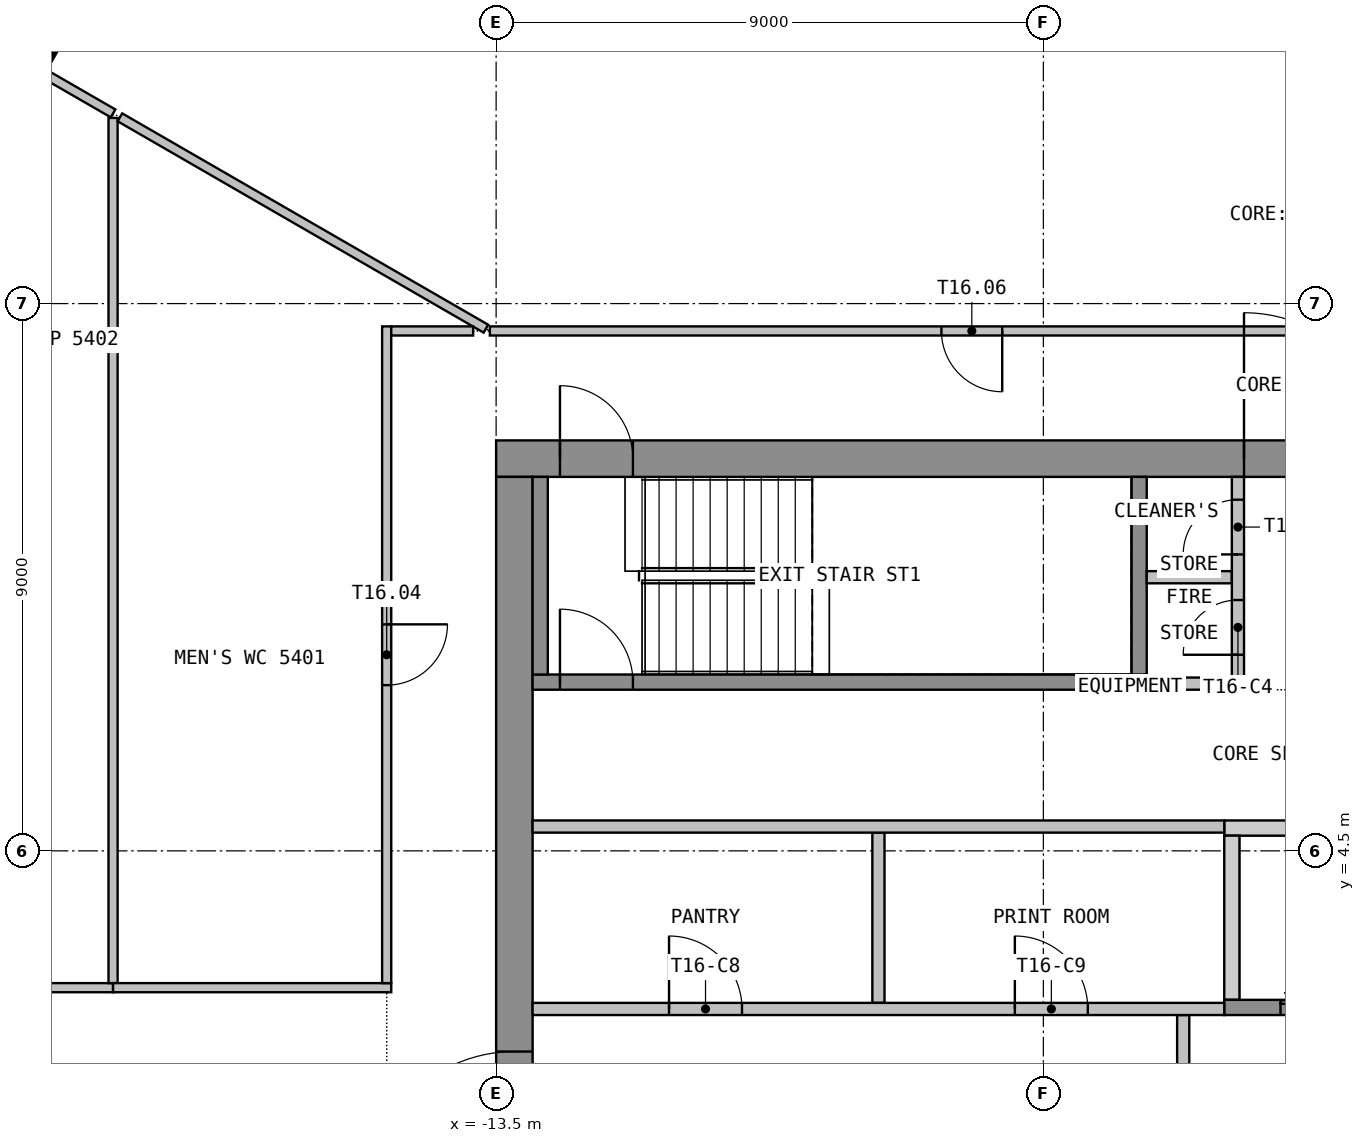
"""IFC4 building model, lengths in metres.
Left out: names, types, materials, properties, quantities, classifications, styles, units other than length and angle.
Written with IfcOpenShell. Run it as: python <this file> out.ifc"""

import sys

from ifc_helpers import new_model, si_unit, direction, frame, frame_2d, origin, origin_2d, place, context, subcontext, project, spatial, polyline, rectangle, outline, extrude, element, fill, save


model = new_model("IFC4")
c1 = context("Model", 3, precision=1e-05, world=origin(), true_north=direction((0.0, 1.0)))
c2 = subcontext(c1, "Body", "Model", "MODEL_VIEW")
j1 = project(units=[si_unit("LENGTHUNIT", "METRE"), si_unit("PLANEANGLEUNIT", "RADIAN")], contexts=[c1])
p1 = place(None, origin())
s1 = spatial("IfcSite", under=j1, at=p1, CompositionType="ELEMENT")
p2 = place(p1, origin())
s2 = spatial("IfcBuilding", under=s1, at=p2, CompositionType="ELEMENT")
p3 = place(p2, frame((0.0, 0.0, 219.0)))
s3 = spatial("IfcBuildingStorey", under=s2, at=p3, CompositionType="ELEMENT", Elevation=219.0)
p4 = place(p3, frame((-21.421, 17.563, 0.0), z_axis=(0.0, 0.0, 1.0), x_axis=(-0.5, -0.866025403784, 0.0)))
e1 = element("IfcColumn", 1, at=p4, inside=s3, PredefinedType="COLUMN", context=c2, shape_type="SweptSolid", body=[
    extrude(rectangle(XDim=0.8, YDim=1.1, at=origin_2d()), origin(), (0.0, 0.0, 1.0), 3.55),
])
p5 = place(p3, frame((-13.5, 10.95, 0.0), z_axis=(0.0, 0.0, 1.0), x_axis=(1.0, 0.0, 0.0)))
e2 = element("IfcWall", 2, at=p5, inside=s3, PredefinedType="SHEAR", context=c2, shape_type="SweptSolid", body=[
    extrude(rectangle(XDim=27.0, YDim=0.6, at=frame_2d((13.5, 0.0))), origin(), (0.0, 0.0, 1.0), 3.55),
])
p6 = place(p5, frame((12.3, 0.0, 0.0)))
e3 = element("IfcOpeningElement", 3, at=p6, cuts=e2, PredefinedType="OPENING", context=c2, shape_type="SweptSolid", body=[
    extrude(rectangle(XDim=2.4, YDim=2.1, at=frame_2d((1.2, 1.05))), frame((0.0, 0.31, 0.0), z_axis=(0.0, -1.0, 0.0), x_axis=(1.0, 0.0, 0.0)), (0.0, 0.0, 1.0), 0.62),
])
p7 = place(p5, frame((1.05, 0.0, 0.0)))
e4 = element("IfcOpeningElement", 4, at=p7, cuts=e2, PredefinedType="OPENING", context=c2, shape_type="SweptSolid", body=[
    extrude(rectangle(XDim=1.2, YDim=2.1, at=frame_2d((0.6, 1.05))), frame((0.0, 0.31, 0.0), z_axis=(0.0, -1.0, 0.0), x_axis=(1.0, 0.0, 0.0)), (0.0, 0.0, 1.0), 0.62),
])
p8 = place(p5, frame((24.75, 0.0, 0.0)))
e5 = element("IfcOpeningElement", 5, at=p8, cuts=e2, PredefinedType="OPENING", context=c2, shape_type="SweptSolid", body=[
    extrude(rectangle(XDim=1.2, YDim=2.1, at=frame_2d((0.6, 1.05))), frame((0.0, 0.31, 0.0), z_axis=(0.0, -1.0, 0.0), x_axis=(1.0, 0.0, 0.0)), (0.0, 0.0, 1.0), 0.62),
])
p9 = place(p3, frame((-13.2, -10.65, 0.0), z_axis=(0.0, 0.0, 1.0), x_axis=(0.0, 1.0, 0.0)))
e6 = element("IfcWall", 6, at=p9, inside=s3, PredefinedType="SHEAR", context=c2, shape_type="SweptSolid", body=[
    extrude(rectangle(XDim=21.3, YDim=0.6, at=frame_2d((10.65, 0.0))), origin(), (0.0, 0.0, 1.0), 3.55),
])
p10 = place(p9, frame((9.45, 0.0, 0.0)))
e7 = element("IfcOpeningElement", 7, at=p10, cuts=e6, PredefinedType="OPENING", context=c2, shape_type="SweptSolid", body=[
    extrude(rectangle(XDim=2.4, YDim=2.1, at=frame_2d((1.2, 1.05))), frame((0.0, 0.31, 0.0), z_axis=(0.0, -1.0, 0.0), x_axis=(1.0, 0.0, 0.0)), (0.0, 0.0, 1.0), 0.62),
])
p11 = place(p3, origin())
e8 = element("IfcWall", 8, at=p11, inside=s3, PredefinedType="SHEAR", context=c2, shape_type="SweptSolid", body=[
    extrude(outline(polyline([(-1.525, 4.75), (1.525, 4.75), (1.525, 5.0), (-1.525, 5.0), (-1.525, 4.75)])), origin(), (0.0, 0.0, 1.0), 3.55),
])
p12 = place(p3, origin())
e9 = element("IfcWall", 9, at=p12, inside=s3, PredefinedType="SHEAR", context=c2, shape_type="SweptSolid", body=[
    extrude(outline(polyline([(-1.525, 2.05), (-1.275, 2.05), (-1.275, 4.75), (-1.525, 4.75), (-1.525, 2.05)])), origin(), (0.0, 0.0, 1.0), 3.55),
])
p13 = place(p3, frame((-1.525, 1.925, 0.0), z_axis=(0.0, 0.0, 1.0), x_axis=(1.0, 0.0, 0.0)))
e10 = element("IfcWall", 10, at=p13, inside=s3, PredefinedType="SHEAR", context=c2, shape_type="SweptSolid", body=[
    extrude(rectangle(XDim=3.05, YDim=0.25, at=frame_2d((1.525, 0.0))), origin(), (0.0, 0.0, 1.0), 3.55),
])
p14 = place(p13, frame((0.925, 0.0, 0.0)))
e11 = element("IfcOpeningElement", 11, at=p14, cuts=e10, PredefinedType="OPENING", context=c2, shape_type="SweptSolid", body=[
    extrude(rectangle(XDim=1.2, YDim=2.1, at=frame_2d((0.6, 1.05))), frame((0.0, 0.135, 0.0), z_axis=(0.0, -1.0, 0.0), x_axis=(1.0, 0.0, 0.0)), (0.0, 0.0, 1.0), 0.27),
])
p15 = place(p3, frame((-2.2, -1.8, 0.0), z_axis=(0.0, 0.0, 1.0), x_axis=(0.0, 1.0, 0.0)))
e12 = element("IfcWall", 12, at=p15, inside=s3, PredefinedType="PARTITIONING", context=c2, shape_type="SweptSolid", body=[
    extrude(rectangle(XDim=3.6, YDim=0.2, at=frame_2d((1.8, 0.0))), origin(), (0.0, 0.0, 1.0), 3.55),
])
p16 = place(p15, frame((1.2, 0.0, 0.0)))
e13 = element("IfcOpeningElement", 13, at=p16, cuts=e12, PredefinedType="OPENING", context=c2, shape_type="SweptSolid", body=[
    extrude(rectangle(XDim=1.2, YDim=2.1, at=frame_2d((0.6, 1.05))), frame((0.0, 0.11, 0.0), z_axis=(0.0, -1.0, 0.0), x_axis=(1.0, 0.0, 0.0)), (0.0, 0.0, 1.0), 0.22),
])
p17 = place(p3, frame((-12.9, 7.275, 0.0), z_axis=(0.0, 0.0, 1.0), x_axis=(1.0, 0.0, 0.0)))
e14 = element("IfcWall", 14, at=p17, inside=s3, PredefinedType="SHEAR", context=c2, shape_type="SweptSolid", body=[
    extrude(rectangle(XDim=10.1, YDim=0.25, at=frame_2d((5.05, 0.0))), origin(), (0.0, 0.0, 1.0), 3.55),
])
p18 = place(p17, frame((0.45, 0.0, 0.0)))
e15 = element("IfcOpeningElement", 15, at=p18, cuts=e14, PredefinedType="OPENING", context=c2, shape_type="SweptSolid", body=[
    extrude(rectangle(XDim=1.2, YDim=2.1, at=frame_2d((0.6, 1.05))), frame((0.0, 0.135, 0.0), z_axis=(0.0, -1.0, 0.0), x_axis=(1.0, 0.0, 0.0)), (0.0, 0.0, 1.0), 0.27),
])
for number, where, z_axis, x_axis in (
    (16, (-12.775, 7.4, 0.0), (0.0, 0.0, 1.0), (0.0, 1.0, 0.0)),
    (17, (-2.925, 7.4, 0.0), (0.0, 0.0, 1.0), (0.0, 1.0, 0.0)),
):
    element("IfcWall", number, at=place(p3, frame(where, z_axis=z_axis, x_axis=x_axis)), inside=s3, PredefinedType="SHEAR", context=c2, shape_type="SweptSolid", body=[
        extrude(rectangle(XDim=3.25, YDim=0.25, at=frame_2d((1.625, 0.0))), origin(), (0.0, 0.0, 1.0), 3.55),
    ])
for number, where, z_axis, x_axis in (
    (18, (-2.8, 7.25, 0.0), (0.0, 0.0, 1.0), (1.0, 0.0, 0.0)),
    (19, (-2.8, 9.0, 0.0), (0.0, 0.0, 1.0), (1.0, 0.0, 0.0)),
):
    element("IfcWall", number, at=place(p3, frame(where, z_axis=z_axis, x_axis=x_axis)), inside=s3, PredefinedType="PARTITIONING", context=c2, shape_type="SweptSolid", body=[
        extrude(rectangle(XDim=1.4, YDim=0.2, at=frame_2d((0.7, 0.0))), origin(), (0.0, 0.0, 1.0), 3.55),
    ])
p19 = place(p3, frame((-1.3, 7.15, 0.0), z_axis=(0.0, 0.0, 1.0), x_axis=(0.0, 1.0, 0.0)))
e20 = element("IfcWall", 20, at=p19, inside=s3, PredefinedType="PARTITIONING", context=c2, shape_type="SweptSolid", body=[
    extrude(rectangle(XDim=3.5, YDim=0.2, at=frame_2d((1.75, 0.0))), origin(), (0.0, 0.0, 1.0), 3.55),
])
p20 = place(p19, frame((0.575, 0.0, 0.0)))
e21 = element("IfcOpeningElement", 21, at=p20, cuts=e20, PredefinedType="OPENING", context=c2, shape_type="SweptSolid", body=[
    extrude(rectangle(XDim=0.9, YDim=2.1, at=frame_2d((0.45, 1.05))), frame((0.0, 0.11, 0.0), z_axis=(0.0, -1.0, 0.0), x_axis=(1.0, 0.0, 0.0)), (0.0, 0.0, 1.0), 0.22),
])
p21 = place(p19, frame((2.225, 0.0, 0.0)))
e22 = element("IfcOpeningElement", 22, at=p21, cuts=e20, PredefinedType="OPENING", context=c2, shape_type="SweptSolid", body=[
    extrude(rectangle(XDim=0.9, YDim=2.1, at=frame_2d((0.45, 1.05))), frame((0.0, 0.11, 0.0), z_axis=(0.0, -1.0, 0.0), x_axis=(1.0, 0.0, 0.0)), (0.0, 0.0, 1.0), 0.22),
])
p22 = place(p3, frame((-7.212, 2.0, 0.0), z_axis=(0.0, 0.0, 1.0), x_axis=(0.0, 1.0, 0.0)))
e23 = element("IfcWall", 23, at=p22, inside=s3, PredefinedType="PARTITIONING", context=c2, shape_type="SweptSolid", body=[
    extrude(rectangle(XDim=2.8, YDim=0.2, at=frame_2d((1.4, 0.0))), origin(), (0.0, 0.0, 1.0), 3.55),
])
p23 = place(p3, frame((-12.9, 1.9, 0.0), z_axis=(0.0, 0.0, 1.0), x_axis=(1.0, 0.0, 0.0)))
e24 = element("IfcWall", 24, at=p23, inside=s3, PredefinedType="PARTITIONING", context=c2, shape_type="SweptSolid", body=[
    extrude(rectangle(XDim=11.375, YDim=0.2, at=frame_2d((5.688, 0.0))), origin(), (0.0, 0.0, 1.0), 3.55),
])
p24 = place(p23, frame((2.244, 0.0, 0.0)))
e25 = element("IfcOpeningElement", 25, at=p24, cuts=e24, PredefinedType="OPENING", context=c2, shape_type="SweptSolid", body=[
    extrude(rectangle(XDim=1.2, YDim=2.1, at=frame_2d((0.6, 1.05))), frame((0.0, 0.11, 0.0), z_axis=(0.0, -1.0, 0.0), x_axis=(1.0, 0.0, 0.0)), (0.0, 0.0, 1.0), 0.22),
])
p25 = place(p23, frame((7.931, 0.0, 0.0)))
e26 = element("IfcOpeningElement", 26, at=p25, cuts=e24, PredefinedType="OPENING", context=c2, shape_type="SweptSolid", body=[
    extrude(rectangle(XDim=1.2, YDim=2.1, at=frame_2d((0.6, 1.05))), frame((0.0, 0.11, 0.0), z_axis=(0.0, -1.0, 0.0), x_axis=(1.0, 0.0, 0.0)), (0.0, 0.0, 1.0), 0.22),
])
p26 = place(p3, frame((-12.9, 4.9, 0.0), z_axis=(0.0, 0.0, 1.0), x_axis=(1.0, 0.0, 0.0)))
e27 = element("IfcWall", 27, at=p26, inside=s3, PredefinedType="PARTITIONING", context=c2, shape_type="SweptSolid", body=[
    extrude(rectangle(XDim=11.375, YDim=0.2, at=frame_2d((5.688, 0.0))), origin(), (0.0, 0.0, 1.0), 3.55),
])
p27 = place(p3, frame((-29.585, 2.25, 0.0), z_axis=(0.0, 0.0, 1.0), x_axis=(1.0, 0.0, 0.0)))
e28 = element("IfcWall", 28, at=p27, inside=s3, PredefinedType="PARTITIONING", context=c2, shape_type="SweptSolid", body=[
    extrude(rectangle(XDim=9.785, YDim=0.15, at=frame_2d((4.893, 0.0))), origin(), (0.0, 0.0, 1.0), 3.55),
])
p28 = place(p27, frame((4.393, 0.0, 0.0)))
e29 = element("IfcOpeningElement", 29, at=p28, cuts=e28, PredefinedType="OPENING", context=c2, shape_type="SweptSolid", body=[
    extrude(rectangle(XDim=1.0, YDim=2.1, at=frame_2d((0.5, 1.05))), frame((0.0, 0.085, 0.0), z_axis=(0.0, -1.0, 0.0), x_axis=(1.0, 0.0, 0.0)), (0.0, 0.0, 1.0), 0.17),
])
p29 = place(p3, frame((-20.927, 17.278, 0.0), z_axis=(0.0, 0.0, 1.0), x_axis=(0.866157475642, -0.499771175029, 0.0)))
e30 = element("IfcWall", 30, at=p29, inside=s3, PredefinedType="PARTITIONING", context=c2, shape_type="SweptSolid", body=[
    extrude(rectangle(XDim=1.301, YDim=0.15, at=frame_2d((0.651, 0.0))), origin(), (0.0, 0.0, 1.0), 3.55),
])
p30 = place(p3, frame((-19.8, 16.553, 0.0), z_axis=(0.0, 0.0, 1.0), x_axis=(0.0, -1.0, 0.0)))
e31 = element("IfcWall", 31, at=p30, inside=s3, PredefinedType="PARTITIONING", context=c2, shape_type="SweptSolid", body=[
    extrude(rectangle(XDim=14.228, YDim=0.15, at=frame_2d((7.114, 0.0))), origin(), (0.0, 0.0, 1.0), 3.55),
])
p31 = place(p3, frame((-19.8, 2.25, 0.0), z_axis=(0.0, 0.0, 1.0), x_axis=(1.0, 0.0, 0.0)))
e32 = element("IfcWall", 32, at=p31, inside=s3, PredefinedType="PARTITIONING", context=c2, shape_type="SweptSolid", body=[
    extrude(rectangle(XDim=4.575, YDim=0.15, at=frame_2d((2.288, 0.0))), origin(), (0.0, 0.0, 1.0), 3.55),
])
p32 = place(p3, frame((-19.688, 16.563, 0.0), z_axis=(0.0, 0.0, 1.0), x_axis=(0.866012448988, -0.500022437694, 0.0)))
e33 = element("IfcWall", 33, at=p32, inside=s3, PredefinedType="PARTITIONING", context=c2, shape_type="SweptSolid", body=[
    extrude(rectangle(XDim=6.951, YDim=0.15, at=frame_2d((3.476, 0.0))), origin(), (0.0, 0.0, 1.0), 3.55),
])
p33 = place(p3, frame((-15.3, 13.125, 0.0), z_axis=(0.0, 0.0, 1.0), x_axis=(0.0, -1.0, 0.0)))
e34 = element("IfcWall", 34, at=p33, inside=s3, PredefinedType="PARTITIONING", context=c2, shape_type="SweptSolid", body=[
    extrude(rectangle(XDim=10.8, YDim=0.15, at=frame_2d((5.4, 0.0))), origin(), (0.0, 0.0, 1.0), 3.55),
])
p34 = place(p33, frame((4.9, 0.0, 0.0)))
e35 = element("IfcOpeningElement", 35, at=p34, cuts=e34, PredefinedType="OPENING", context=c2, shape_type="SweptSolid", body=[
    extrude(rectangle(XDim=1.0, YDim=2.1, at=frame_2d((0.5, 1.05))), frame((0.0, 0.085, 0.0), z_axis=(0.0, -1.0, 0.0), x_axis=(1.0, 0.0, 0.0)), (0.0, 0.0, 1.0), 0.17),
])
p35 = place(p3, frame((-13.878, 13.05, 0.0), z_axis=(0.0, 0.0, 1.0), x_axis=(-1.0, 0.0, 0.0)))
e36 = element("IfcWall", 36, at=p35, inside=s3, PredefinedType="PARTITIONING", context=c2, shape_type="SweptSolid", body=[
    extrude(rectangle(XDim=1.347, YDim=0.15, at=frame_2d((0.674, 0.0))), origin(), (0.0, 0.0, 1.0), 3.55),
])
p36 = place(p3, frame((2.25, 13.05, 0.0), z_axis=(0.0, 0.0, 1.0), x_axis=(-1.0, 0.0, 0.0)))
e37 = element("IfcWall", 37, at=p36, inside=s3, PredefinedType="PARTITIONING", context=c2, shape_type="SweptSolid", body=[
    extrude(rectangle(XDim=15.853, YDim=0.15, at=frame_2d((7.927, 0.0))), origin(), (0.0, 0.0, 1.0), 3.55),
])
p37 = place(p36, frame((7.427, 0.0, 0.0)))
e38 = element("IfcOpeningElement", 38, at=p37, cuts=e37, PredefinedType="OPENING", context=c2, shape_type="SweptSolid", body=[
    extrude(rectangle(XDim=1.0, YDim=2.1, at=frame_2d((0.5, 1.05))), frame((0.0, 0.085, 0.0), z_axis=(0.0, -1.0, 0.0), x_axis=(1.0, 0.0, 0.0)), (0.0, 0.0, 1.0), 0.17),
])
p38 = place(p10, origin())
e39 = element("IfcDoor", 39, at=p38, inside=s3, OperationType="DOUBLE_DOOR_DOUBLE_SWING", PredefinedType="DOOR", context=c2, shape_type="SweptSolid", body=[
    extrude(rectangle(XDim=2.4, YDim=2.1, at=frame_2d((1.2, 1.05))), frame((0.0, 0.025, 0.0), z_axis=(0.0, -1.0, 0.0), x_axis=(1.0, 0.0, 0.0)), (0.0, 0.0, 1.0), 0.05),
])
fill(e7, e39)
p39 = place(p6, origin())
e40 = element("IfcDoor", 40, at=p39, inside=s3, OperationType="DOUBLE_DOOR_DOUBLE_SWING", PredefinedType="DOOR", context=c2, shape_type="SweptSolid", body=[
    extrude(rectangle(XDim=2.4, YDim=2.1, at=frame_2d((1.2, 1.05))), frame((0.0, 0.025, 0.0), z_axis=(0.0, -1.0, 0.0), x_axis=(1.0, 0.0, 0.0)), (0.0, 0.0, 1.0), 0.05),
])
fill(e3, e40)
p40 = place(p7, origin())
e41 = element("IfcDoor", 41, at=p40, inside=s3, OperationType="SINGLE_SWING_RIGHT", PredefinedType="DOOR", context=c2, shape_type="SweptSolid", body=[
    extrude(rectangle(XDim=1.2, YDim=2.1, at=frame_2d((0.6, 1.05))), frame((0.0, 0.025, 0.0), z_axis=(0.0, -1.0, 0.0), x_axis=(1.0, 0.0, 0.0)), (0.0, 0.0, 1.0), 0.05),
])
fill(e4, e41)
p41 = place(p14, origin())
e42 = element("IfcDoor", 42, at=p41, inside=s3, OperationType="DOUBLE_DOOR_SLIDING", PredefinedType="DOOR", context=c2, shape_type="SweptSolid", body=[
    extrude(rectangle(XDim=1.2, YDim=2.1, at=frame_2d((0.6, 1.05))), frame((0.0, 0.025, 0.0), z_axis=(0.0, -1.0, 0.0), x_axis=(1.0, 0.0, 0.0)), (0.0, 0.0, 1.0), 0.05),
])
fill(e11, e42)
p42 = place(p18, origin())
e43 = element("IfcDoor", 43, at=p42, inside=s3, OperationType="SINGLE_SWING_LEFT", PredefinedType="DOOR", context=c2, shape_type="SweptSolid", body=[
    extrude(rectangle(XDim=1.2, YDim=2.1, at=frame_2d((0.6, 1.05))), frame((0.0, 0.025, 0.0), z_axis=(0.0, -1.0, 0.0), x_axis=(1.0, 0.0, 0.0)), (0.0, 0.0, 1.0), 0.05),
])
fill(e15, e43)
p43 = place(p20, origin())
e44 = element("IfcDoor", 44, at=p43, inside=s3, OperationType="SINGLE_SWING_LEFT", PredefinedType="DOOR", context=c2, shape_type="SweptSolid", body=[
    extrude(rectangle(XDim=0.9, YDim=2.1, at=frame_2d((0.45, 1.05))), frame((0.0, 0.025, 0.0), z_axis=(0.0, -1.0, 0.0), x_axis=(1.0, 0.0, 0.0)), (0.0, 0.0, 1.0), 0.05),
])
fill(e21, e44)
p44 = place(p21, origin())
e45 = element("IfcDoor", 45, at=p44, inside=s3, OperationType="SINGLE_SWING_LEFT", PredefinedType="DOOR", context=c2, shape_type="SweptSolid", body=[
    extrude(rectangle(XDim=0.9, YDim=2.1, at=frame_2d((0.45, 1.05))), frame((0.0, 0.025, 0.0), z_axis=(0.0, -1.0, 0.0), x_axis=(1.0, 0.0, 0.0)), (0.0, 0.0, 1.0), 0.05),
])
fill(e22, e45)
p45 = place(p24, origin())
e46 = element("IfcDoor", 46, at=p45, inside=s3, OperationType="SINGLE_SWING_RIGHT", PredefinedType="DOOR", context=c2, shape_type="SweptSolid", body=[
    extrude(rectangle(XDim=1.2, YDim=2.1, at=frame_2d((0.6, 1.05))), frame((0.0, 0.025, 0.0), z_axis=(0.0, -1.0, 0.0), x_axis=(1.0, 0.0, 0.0)), (0.0, 0.0, 1.0), 0.05),
])
fill(e25, e46)
p46 = place(p25, origin())
e47 = element("IfcDoor", 47, at=p46, inside=s3, OperationType="SINGLE_SWING_RIGHT", PredefinedType="DOOR", context=c2, shape_type="SweptSolid", body=[
    extrude(rectangle(XDim=1.2, YDim=2.1, at=frame_2d((0.6, 1.05))), frame((0.0, 0.025, 0.0), z_axis=(0.0, -1.0, 0.0), x_axis=(1.0, 0.0, 0.0)), (0.0, 0.0, 1.0), 0.05),
])
fill(e26, e47)
p47 = place(p34, origin())
e48 = element("IfcDoor", 48, at=p47, inside=s3, OperationType="SINGLE_SWING_LEFT", PredefinedType="DOOR", context=c2, shape_type="SweptSolid", body=[
    extrude(rectangle(XDim=1.0, YDim=2.1, at=frame_2d((0.5, 1.05))), frame((0.0, 0.025, 0.0), z_axis=(0.0, -1.0, 0.0), x_axis=(1.0, 0.0, 0.0)), (0.0, 0.0, 1.0), 0.05),
])
fill(e35, e48)
p48 = place(p37, origin())
e49 = element("IfcDoor", 49, at=p48, inside=s3, OperationType="SINGLE_SWING_RIGHT", PredefinedType="DOOR", context=c2, shape_type="SweptSolid", body=[
    extrude(rectangle(XDim=1.0, YDim=2.1, at=frame_2d((0.5, 1.05))), frame((0.0, 0.025, 0.0), z_axis=(0.0, -1.0, 0.0), x_axis=(1.0, 0.0, 0.0)), (0.0, 0.0, 1.0), 0.05),
])
fill(e38, e49)
save(model, sys.argv[1])
